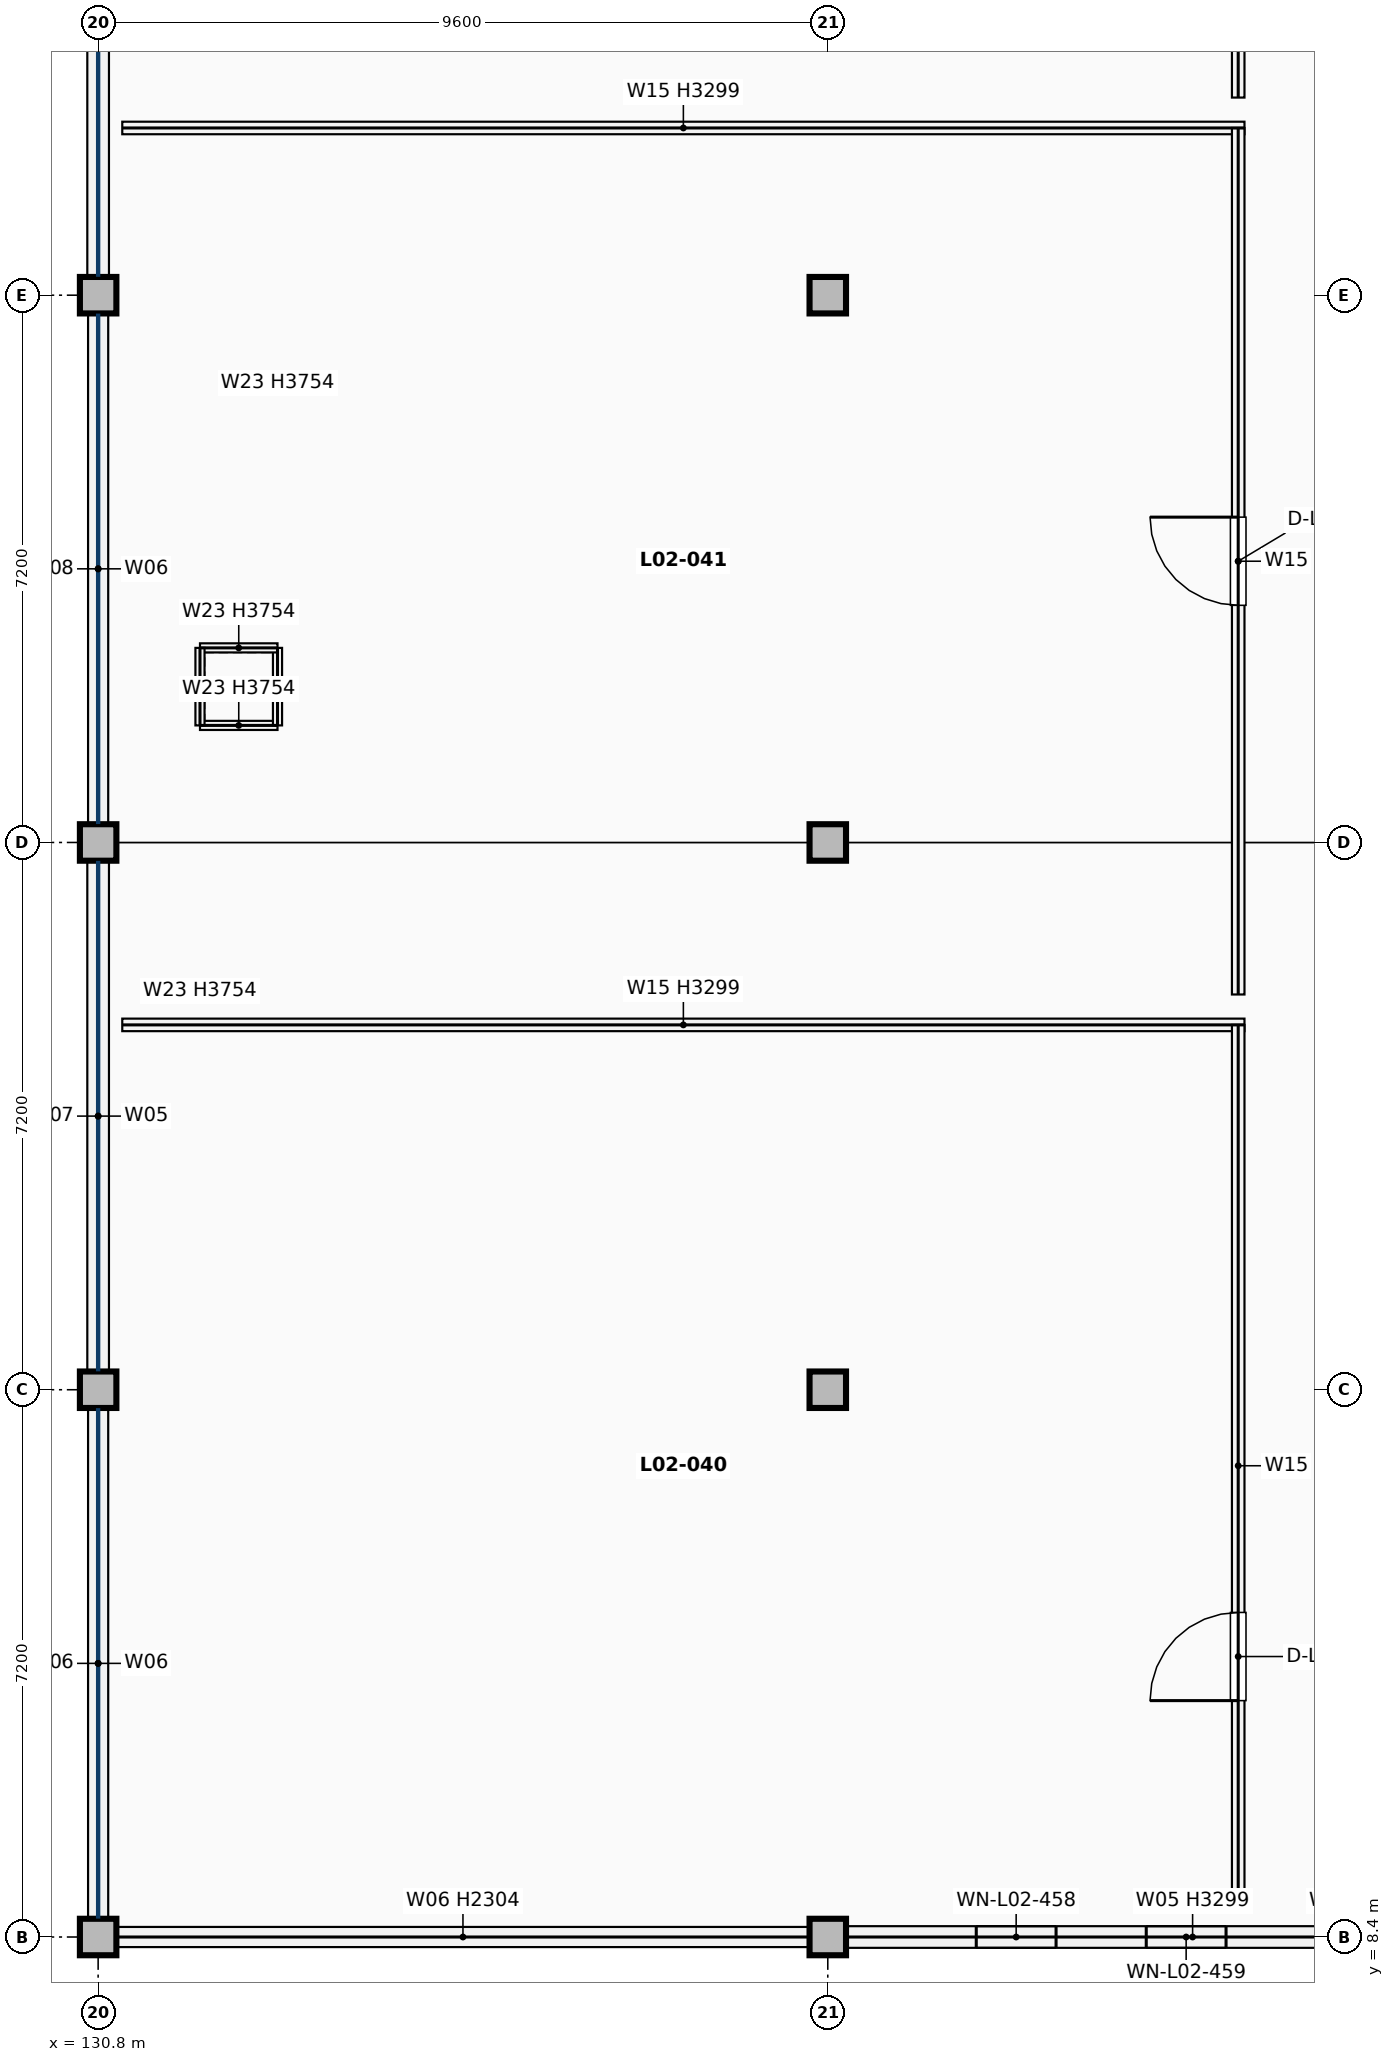
"""IFC4 building model, lengths in metres.
Left out: names, types, materials, properties, quantities, classifications, styles, units other than length and angle.
Written with IfcOpenShell. Run it as: python <this file> out.ifc"""

import sys

from ifc_helpers import new_model, si_unit, direction, frame, frame_2d, origin, origin_2d, place, context, subcontext, project, spatial, rectangle, extrude, element, fill, save


model = new_model("IFC4")
c1 = context("Model", 3, precision=1e-05, world=origin(), true_north=direction((0.0, 1.0)))
c2 = subcontext(c1, "Body", "Model", "MODEL_VIEW")
j1 = project(units=[si_unit("LENGTHUNIT", "METRE"), si_unit("PLANEANGLEUNIT", "RADIAN")], contexts=[c1])
p1 = place(None, origin())
s1 = spatial("IfcSite", under=j1, at=p1, CompositionType="ELEMENT")
p2 = place(p1, origin())
s2 = spatial("IfcBuilding", under=s1, at=p2, CompositionType="ELEMENT")
p3 = place(p2, frame((0.0, 0.0, 9.52)))
s3 = spatial("IfcBuildingStorey", under=s2, at=p3, CompositionType="ELEMENT", Elevation=9.52)
for number, where, z_axis, x_axis in (
    (1, (130.8, 8.4, 0.0), (0.0, 0.0, 1.0), (1.0, 0.0, 0.0)),
    (2, (130.8, 15.6, 0.0), (0.0, 0.0, 1.0), (1.0, 0.0, 0.0)),
    (3, (130.8, 22.8, 0.0), (0.0, 0.0, 1.0), (1.0, 0.0, 0.0)),
    (4, (130.8, 30.0, 0.0), (0.0, 0.0, 1.0), (1.0, 0.0, 0.0)),
    (5, (140.4, 8.4, 0.0), (0.0, 0.0, 1.0), (1.0, 0.0, 0.0)),
    (6, (140.4, 15.6, 0.0), (0.0, 0.0, 1.0), (1.0, 0.0, 0.0)),
    (7, (140.4, 22.8, 0.0), (0.0, 0.0, 1.0), (1.0, 0.0, 0.0)),
    (8, (140.4, 30.0, 0.0), (0.0, 0.0, 1.0), (1.0, 0.0, 0.0)),
):
    element("IfcColumn", number, at=place(p3, frame(where, z_axis=z_axis, x_axis=x_axis)), inside=s3, PredefinedType="COLUMN", context=c2, shape_type="SweptSolid", body=[
        extrude(rectangle(XDim=0.48, YDim=0.48, at=origin_2d()), origin(), (0.0, 0.0, 1.0), 4.08),
    ])
p4 = place(p3, frame((130.8, 8.642, 0.0), z_axis=(0.0, 0.0, 1.0), x_axis=(0.0, 1.0, 0.0)))
e9 = element("IfcWall", 9, at=p4, inside=s3, PredefinedType="SOLIDWALL", context=c2, shape_type="SweptSolid", body=[
    extrude(rectangle(XDim=6.716, YDim=0.265, at=frame_2d((3.358, 0.0))), origin(), (0.0, 0.0, 1.0), 0.85),
])
p5 = place(p3, frame((130.8, 15.842, 0.0), z_axis=(0.0, 0.0, 1.0), x_axis=(0.0, 1.0, 0.0)))
e10 = element("IfcWall", 10, at=p5, inside=s3, PredefinedType="SOLIDWALL", context=c2, shape_type="SweptSolid", body=[
    extrude(rectangle(XDim=6.716, YDim=0.285, at=frame_2d((3.358, 0.0))), origin(), (0.0, 0.0, 1.0), 0.85),
])
p6 = place(p3, frame((130.8, 23.042, 0.0), z_axis=(0.0, 0.0, 1.0), x_axis=(0.0, 1.0, 0.0)))
e11 = element("IfcWall", 11, at=p6, inside=s3, PredefinedType="SOLIDWALL", context=c2, shape_type="SweptSolid", body=[
    extrude(rectangle(XDim=6.716, YDim=0.265, at=frame_2d((3.358, 0.0))), origin(), (0.0, 0.0, 1.0), 0.85),
])
p7 = place(p3, frame((130.8, 30.242, 0.0), z_axis=(0.0, 0.0, 1.0), x_axis=(0.0, 1.0, 0.0)))
e12 = element("IfcWall", 12, at=p7, inside=s3, PredefinedType="SOLIDWALL", context=c2, shape_type="SweptSolid", body=[
    extrude(rectangle(XDim=6.716, YDim=0.285, at=frame_2d((3.358, 0.0))), origin(), (0.0, 0.0, 1.0), 0.85),
])
p8 = place(p3, frame((131.042, 8.4, 0.0), z_axis=(0.0, 0.0, 1.0), x_axis=(1.0, 0.0, 0.0)))
e13 = element("IfcWall", 13, at=p8, inside=s3, PredefinedType="SOLIDWALL", context=c2, shape_type="SweptSolid", body=[
    extrude(rectangle(XDim=9.116, YDim=0.265, at=frame_2d((4.558, 0.0))), origin(), (0.0, 0.0, 1.0), 2.304),
])
p9 = place(p3, frame((140.642, 8.4, 0.0), z_axis=(0.0, 0.0, 1.0), x_axis=(1.0, 0.0, 0.0)))
e14 = element("IfcWall", 14, at=p9, inside=s3, PredefinedType="SOLIDWALL", context=c2, shape_type="SweptSolid", body=[
    extrude(rectangle(XDim=9.116, YDim=0.285, at=frame_2d((4.558, 0.0))), origin(), (0.0, 0.0, 1.0), 3.299),
])
p10 = place(p9, frame((1.711, 0.0, 0.75)))
e15 = element("IfcOpeningElement", 15, at=p10, cuts=e14, PredefinedType="OPENING", context=c2, shape_type="SweptSolid", body=[
    extrude(rectangle(XDim=1.05, YDim=1.5, at=frame_2d((0.525, 0.75))), frame((0.0, 0.152, 0.0), z_axis=(0.0, -1.0, 0.0), x_axis=(1.0, 0.0, 0.0)), (0.0, 0.0, 1.0), 0.305),
])
p11 = place(p9, frame((3.948, 0.0, 0.75)))
e16 = element("IfcOpeningElement", 16, at=p11, cuts=e14, PredefinedType="OPENING", context=c2, shape_type="SweptSolid", body=[
    extrude(rectangle(XDim=1.05, YDim=1.5, at=frame_2d((0.525, 0.75))), frame((0.0, 0.152, 0.0), z_axis=(0.0, -1.0, 0.0), x_axis=(1.0, 0.0, 0.0)), (0.0, 0.0, 1.0), 0.305),
])
p12 = place(p9, frame((6.354, 0.0, 0.75)))
e17 = element("IfcOpeningElement", 17, at=p12, cuts=e14, PredefinedType="OPENING", context=c2, shape_type="SweptSolid", body=[
    extrude(rectangle(XDim=1.05, YDim=1.5, at=frame_2d((0.525, 0.75))), frame((0.0, 0.152, 0.0), z_axis=(0.0, -1.0, 0.0), x_axis=(1.0, 0.0, 0.0)), (0.0, 0.0, 1.0), 0.305),
])
for number, where, z_axis, x_axis in (
    (18, (132.14, 24.34, 0.0), (0.0, 0.0, 1.0), (1.0, 0.0, 0.0)),
    (19, (133.16, 24.34, 0.0), (0.0, 0.0, 1.0), (0.0, 1.0, 0.0)),
    (20, (133.16, 25.36, 0.0), (0.0, 0.0, 1.0), (-1.0, 0.0, 0.0)),
    (21, (132.14, 25.36, 0.0), (0.0, 0.0, 1.0), (0.0, -1.0, 0.0)),
):
    element("IfcWall", number, at=place(p3, frame(where, z_axis=z_axis, x_axis=x_axis)), inside=s3, PredefinedType="PARTITIONING", context=c2, shape_type="SweptSolid", body=[
        extrude(rectangle(XDim=1.02, YDim=0.12, at=frame_2d((0.51, 0.0))), origin(), (0.0, 0.0, 1.0), 3.754),
    ])
p13 = place(p3, frame((131.117, 20.4, 0.0), z_axis=(0.0, 0.0, 1.0), x_axis=(1.0, 0.0, 0.0)))
e22 = element("IfcWall", 22, at=p13, inside=s3, PredefinedType="PARTITIONING", context=c2, shape_type="SweptSolid", body=[
    extrude(rectangle(XDim=14.765, YDim=0.165, at=frame_2d((7.383, 0.0))), origin(), (0.0, 0.0, 1.0), 3.299),
])
p14 = place(p3, frame((145.8, 8.8, 0.0), z_axis=(0.0, 0.0, 1.0), x_axis=(0.0, 1.0, 0.0)))
e23 = element("IfcWall", 23, at=p14, inside=s3, PredefinedType="PARTITIONING", context=c2, shape_type="SweptSolid", body=[
    extrude(rectangle(XDim=11.6, YDim=0.165, at=frame_2d((5.8, 0.0))), origin(), (0.0, 0.0, 1.0), 2.979),
])
p15 = place(p14, frame((2.71, 0.0, 0.0)))
e24 = element("IfcOpeningElement", 24, at=p15, cuts=e23, PredefinedType="OPENING", context=c2, shape_type="SweptSolid", body=[
    extrude(rectangle(XDim=1.16, YDim=2.22, at=frame_2d((0.58, 1.11))), frame((0.0, 0.093, 0.0), z_axis=(0.0, -1.0, 0.0), x_axis=(1.0, 0.0, 0.0)), (0.0, 0.0, 1.0), 0.185),
])
p16 = place(p3, frame((131.117, 32.2, 0.0), z_axis=(0.0, 0.0, 1.0), x_axis=(1.0, 0.0, 0.0)))
e25 = element("IfcWall", 25, at=p16, inside=s3, PredefinedType="PARTITIONING", context=c2, shape_type="SweptSolid", body=[
    extrude(rectangle(XDim=14.765, YDim=0.165, at=frame_2d((7.383, 0.0))), origin(), (0.0, 0.0, 1.0), 3.299),
])
p17 = place(p3, frame((145.8, 20.8, 0.0), z_axis=(0.0, 0.0, 1.0), x_axis=(0.0, 1.0, 0.0)))
e26 = element("IfcWall", 26, at=p17, inside=s3, PredefinedType="PARTITIONING", context=c2, shape_type="SweptSolid", body=[
    extrude(rectangle(XDim=11.4, YDim=0.165, at=frame_2d((5.7, 0.0))), origin(), (0.0, 0.0, 1.0), 2.979),
])
p18 = place(p17, frame((5.12, 0.0, 0.0)))
e27 = element("IfcOpeningElement", 27, at=p18, cuts=e26, PredefinedType="OPENING", context=c2, shape_type="SweptSolid", body=[
    extrude(rectangle(XDim=1.16, YDim=2.22, at=frame_2d((0.58, 1.11))), frame((0.0, 0.093, 0.0), z_axis=(0.0, -1.0, 0.0), x_axis=(1.0, 0.0, 0.0)), (0.0, 0.0, 1.0), 0.185),
])
p19 = place(p3, frame((145.8, 32.6, 0.0), z_axis=(0.0, 0.0, 1.0), x_axis=(0.0, 1.0, 0.0)))
e28 = element("IfcWall", 28, at=p19, inside=s3, PredefinedType="PARTITIONING", context=c2, shape_type="SweptSolid", body=[
    extrude(rectangle(XDim=11.4, YDim=0.165, at=frame_2d((5.7, 0.0))), origin(), (0.0, 0.0, 1.0), 2.979),
])
p20 = place(p19, frame((7.58, 0.0, 0.0)))
e29 = element("IfcOpeningElement", 29, at=p20, cuts=e28, PredefinedType="OPENING", context=c2, shape_type="SweptSolid", body=[
    extrude(rectangle(XDim=1.16, YDim=2.22, at=frame_2d((0.58, 1.11))), frame((0.0, 0.093, 0.0), z_axis=(0.0, -1.0, 0.0), x_axis=(1.0, 0.0, 0.0)), (0.0, 0.0, 1.0), 0.185),
])
p21 = place(p10, origin())
e30 = element("IfcWindow", 30, at=p21, inside=s3, PartitioningType="SINGLE_PANEL", PredefinedType="WINDOW", context=c2, shape_type="SweptSolid", body=[
    extrude(rectangle(XDim=1.05, YDim=1.5, at=frame_2d((0.525, 0.75))), frame((0.0, 0.03, 0.0), z_axis=(0.0, -1.0, 0.0), x_axis=(1.0, 0.0, 0.0)), (0.0, 0.0, 1.0), 0.06),
])
fill(e15, e30)
p22 = place(p11, origin())
e31 = element("IfcWindow", 31, at=p22, inside=s3, PartitioningType="SINGLE_PANEL", PredefinedType="WINDOW", context=c2, shape_type="SweptSolid", body=[
    extrude(rectangle(XDim=1.05, YDim=1.5, at=frame_2d((0.525, 0.75))), frame((0.0, 0.03, 0.0), z_axis=(0.0, -1.0, 0.0), x_axis=(1.0, 0.0, 0.0)), (0.0, 0.0, 1.0), 0.06),
])
fill(e16, e31)
p23 = place(p15, origin())
e32 = element("IfcDoor", 32, at=p23, inside=s3, OperationType="SINGLE_SWING_LEFT", PredefinedType="DOOR", context=c2, shape_type="SweptSolid", body=[
    extrude(rectangle(XDim=1.16, YDim=2.22, at=frame_2d((0.58, 1.11))), frame((0.0, 0.025, 0.0), z_axis=(0.0, -1.0, 0.0), x_axis=(1.0, 0.0, 0.0)), (0.0, 0.0, 1.0), 0.05),
])
fill(e24, e32)
p24 = place(p18, origin())
e33 = element("IfcDoor", 33, at=p24, inside=s3, OperationType="SINGLE_SWING_RIGHT", PredefinedType="DOOR", context=c2, shape_type="SweptSolid", body=[
    extrude(rectangle(XDim=1.16, YDim=2.22, at=frame_2d((0.58, 1.11))), frame((0.0, 0.025, 0.0), z_axis=(0.0, -1.0, 0.0), x_axis=(1.0, 0.0, 0.0)), (0.0, 0.0, 1.0), 0.05),
])
fill(e27, e33)
save(model, sys.argv[1])
